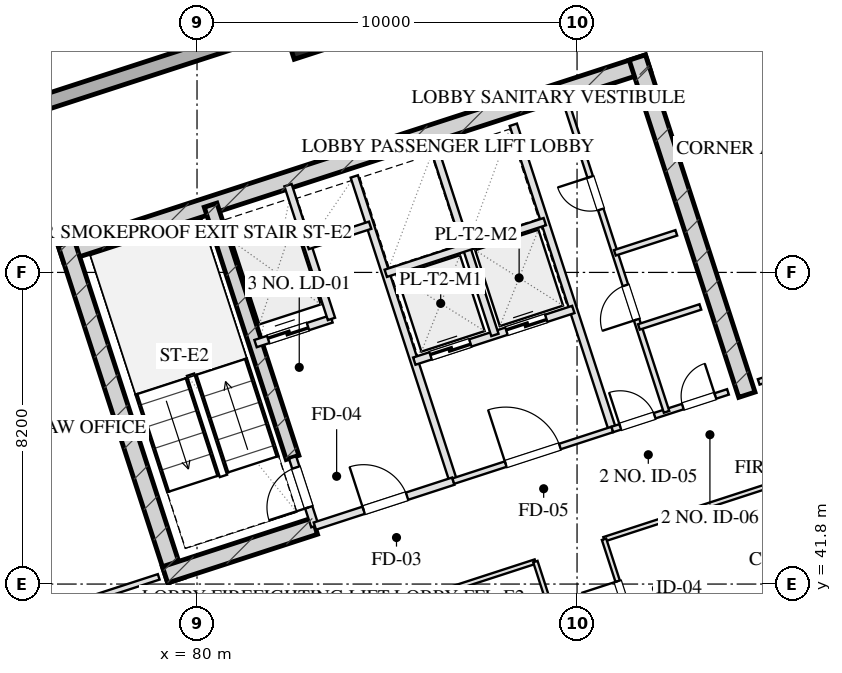
"""IFC4 building model, lengths in metres.
Left out: names, types, materials, properties, quantities, classifications, styles, units other than length and angle.
Written with IfcOpenShell. Run it as: python <this file> out.ifc"""

import sys

from ifc_helpers import new_model, si_unit, direction, frame, frame_2d, origin, origin_2d, place, context, subcontext, project, spatial, rectangle, hollow_rectangle, extrude, element, fill, save


model = new_model("IFC4")
c1 = context("Model", 3, precision=1e-05, world=origin(), true_north=direction((0.0, 1.0)))
c2 = subcontext(c1, "Body", "Model", "MODEL_VIEW")
j1 = project(units=[si_unit("LENGTHUNIT", "METRE"), si_unit("PLANEANGLEUNIT", "RADIAN")], contexts=[c1])
p1 = place(None, origin())
s1 = spatial("IfcSite", under=j1, at=p1, CompositionType="ELEMENT")
p2 = place(p1, origin())
s2 = spatial("IfcBuilding", under=s1, at=p2, CompositionType="ELEMENT")
p3 = place(p2, frame((0.0, 0.0, 195.5)))
s3 = spatial("IfcBuildingStorey", under=s2, at=p3, CompositionType="ELEMENT", Elevation=195.5)
p4 = place(p3, frame((76.415, 50.489, 0.0), z_axis=(0.0, 0.0, 1.0), x_axis=(0.951056810414, 0.309016089169, 0.0)))
e1 = element("IfcWall", 1, at=p4, inside=s3, PredefinedType="SHEAR", context=c2, shape_type="SweptSolid", body=[
    extrude(rectangle(XDim=16.25, YDim=0.45, at=frame_2d((8.125, 0.0))), origin(), (0.0, 0.0, 1.0), 3.45),
])
for number, where, z_axis, x_axis in (
    (2, (79.442, 41.899, 0.0), (0.0, 0.0, 1.0), (-0.309, 0.951, 0.0)),
    (3, (94.469, 46.781, 0.0), (0.0, 0.0, 1.0), (-0.309, 0.951, 0.0)),
):
    element("IfcWall", number, at=place(p3, frame(where, z_axis=z_axis, x_axis=x_axis)), inside=s3, PredefinedType="SHEAR", context=c2, shape_type="SweptSolid", body=[
        extrude(rectangle(XDim=9.33, YDim=0.45, at=frame_2d((4.665, 0.0))), origin(), (0.0, 0.0, 1.0), 3.45),
    ])
p5 = place(p3, frame((82.514, 45.131, 0.0), z_axis=(0.0, 0.0, 1.0), x_axis=(-0.308988790936, 0.951065679686, 0.0)))
e4 = element("IfcWall", 4, at=p5, inside=s3, PredefinedType="SHEAR", context=c2, shape_type="SweptSolid", body=[
    extrude(rectangle(XDim=6.98, YDim=0.35, at=frame_2d((3.49, 0.0))), origin(), (0.0, 0.0, 1.0), 3.45),
])
p6 = place(p3, frame((79.159, 42.043, 0.0), z_axis=(0.0, 0.0, 1.0), x_axis=(0.951047485828, 0.309044785913, 0.0)))
e5 = element("IfcWall", 5, at=p6, inside=s3, PredefinedType="SHEAR", context=c2, shape_type="SweptSolid", body=[
    extrude(rectangle(XDim=4.145, YDim=0.45, at=frame_2d((2.073, 0.0))), origin(), (0.0, 0.0, 1.0), 3.45),
])
p7 = place(p3, frame((82.815, 56.112, 0.0), z_axis=(0.0, 0.0, 1.0), x_axis=(0.951056516295, 0.309016994375, 0.0)))
e6 = element("IfcColumn", 6, at=p7, inside=s3, PredefinedType="COLUMN", context=c2, shape_type="SweptSolid", body=[
    extrude(hollow_rectangle(XDim=0.8, YDim=0.8, WallThickness=0.028, at=origin_2d()), origin(), (0.0, 0.0, 1.0), 3.451),
])
p8 = place(p3, frame((81.776, 8.827, 0.0), z_axis=(0.0, 0.0, 1.0), x_axis=(-0.309014228706, 0.951057414911, 0.0)))
e7 = element("IfcWall", 7, at=p8, inside=s3, PredefinedType="SOLIDWALL", context=c2, shape_type="SweptSolid", body=[
    extrude(rectangle(XDim=42.8, YDim=0.4, at=frame_2d((21.4, 0.0))), origin(), (0.0, 0.0, 1.0), 2.61),
])
p9 = place(p8, frame((22.95, 0.0, 0.75)))
e8 = element("IfcOpeningElement", 8, at=p9, cuts=e7, PredefinedType="OPENING", context=c2, shape_type="SweptSolid", body=[
    extrude(rectangle(XDim=2.1, YDim=1.46, at=frame_2d((1.05, 0.73))), frame((0.0, 0.21, 0.0), z_axis=(0.0, -1.0, 0.0), x_axis=(1.0, 0.0, 0.0)), (0.0, 0.0, 1.0), 0.42),
])
p10 = place(p8, frame((26.75, 0.0, 0.75)))
e9 = element("IfcOpeningElement", 9, at=p10, cuts=e7, PredefinedType="OPENING", context=c2, shape_type="SweptSolid", body=[
    extrude(rectangle(XDim=2.1, YDim=1.46, at=frame_2d((1.05, 0.73))), frame((0.0, 0.21, 0.0), z_axis=(0.0, -1.0, 0.0), x_axis=(1.0, 0.0, 0.0)), (0.0, 0.0, 1.0), 0.42),
])
p11 = place(p8, frame((17.787, 0.0, 0.0)))
e10 = element("IfcOpeningElement", 10, at=p11, cuts=e7, PredefinedType="OPENING", context=c2, shape_type="SweptSolid", body=[
    extrude(rectangle(XDim=1.1, YDim=2.15, at=frame_2d((0.55, 1.075))), frame((0.0, 0.21, 0.0), z_axis=(0.0, -1.0, 0.0), x_axis=(1.0, 0.0, 0.0)), (0.0, 0.0, 1.0), 0.42),
])
p12 = place(p3, frame((70.092, 52.556, 0.0), z_axis=(0.0, 0.0, 1.0), x_axis=(0.951057580055, 0.30901372044, 0.0)))
e11 = element("IfcWall", 11, at=p12, inside=s3, PredefinedType="SOLIDWALL", context=c2, shape_type="SweptSolid", body=[
    extrude(rectangle(XDim=26.4, YDim=0.4, at=frame_2d((13.2, 0.0))), origin(), (0.0, 0.0, 1.0), 2.61),
])
p13 = place(p3, frame((83.101, 43.324, 0.0), z_axis=(0.0, 0.0, 1.0), x_axis=(-0.309048298632, 0.951046344356, 0.0)))
e12 = element("IfcWall", 12, at=p13, inside=s3, PredefinedType="PARTITIONING", context=c2, shape_type="SweptSolid", body=[
    extrude(rectangle(XDim=1.9, YDim=0.2, at=frame_2d((0.95, 0.0))), origin(), (0.0, 0.0, 1.0), 3.175),
])
p14 = place(p13, frame((0.52, 0.0, 0.0)))
e13 = element("IfcOpeningElement", 13, at=p14, cuts=e12, PredefinedType="OPENING", context=c2, shape_type="SweptSolid", body=[
    extrude(rectangle(XDim=1.1, YDim=2.05, at=frame_2d((0.55, 1.025))), frame((0.0, 0.11, 0.0), z_axis=(0.0, -1.0, 0.0), x_axis=(1.0, 0.0, 0.0)), (0.0, 0.0, 1.0), 0.22),
])
p15 = place(p3, frame((86.743, 44.508, 0.0), z_axis=(0.0, 0.0, 1.0), x_axis=(-0.309016001439, 0.951056838919, 0.0)))
e14 = element("IfcWall", 14, at=p15, inside=s3, PredefinedType="PARTITIONING", context=c2, shape_type="SweptSolid", body=[
    extrude(rectangle(XDim=8.43, YDim=0.2, at=frame_2d((4.215, 0.0))), origin(), (0.0, 0.0, 1.0), 3.175),
])
p16 = place(p3, frame((83.101, 43.324, 0.0), z_axis=(0.0, 0.0, 1.0), x_axis=(0.951052804469, 0.309028417967, 0.0)))
e15 = element("IfcWall", 15, at=p16, inside=s3, PredefinedType="PARTITIONING", context=c2, shape_type="SweptSolid", body=[
    extrude(rectangle(XDim=3.83, YDim=0.2, at=frame_2d((1.915, 0.0))), origin(), (0.0, 0.0, 1.0), 3.175),
])
p17 = place(p16, frame((1.35, 0.0, 0.0)))
e16 = element("IfcOpeningElement", 16, at=p17, cuts=e15, PredefinedType="OPENING", context=c2, shape_type="SweptSolid", body=[
    extrude(rectangle(XDim=1.2, YDim=2.05, at=frame_2d((0.6, 1.025))), frame((0.0, 0.11, 0.0), z_axis=(0.0, -1.0, 0.0), x_axis=(1.0, 0.0, 0.0)), (0.0, 0.0, 1.0), 0.22),
])
p18 = place(p3, frame((81.54, 48.127, 0.0), z_axis=(0.0, 0.0, 1.0), x_axis=(0.951062257173, 0.308999325213, 0.0)))
e17 = element("IfcWall", 17, at=p18, inside=s3, PredefinedType="PARTITIONING", context=c2, shape_type="SweptSolid", body=[
    extrude(rectangle(XDim=2.1, YDim=0.2, at=frame_2d((1.05, 0.0))), origin(), (0.0, 0.0, 1.0), 3.175),
])
p19 = place(p18, frame((0.35, 0.0, 0.0)))
e18 = element("IfcOpeningElement", 18, at=p19, cuts=e17, PredefinedType="OPENING", context=c2, shape_type="SweptSolid", body=[
    extrude(rectangle(XDim=1.1, YDim=2.05, at=frame_2d((0.55, 1.025))), frame((0.0, 0.11, 0.0), z_axis=(0.0, -1.0, 0.0), x_axis=(1.0, 0.0, 0.0)), (0.0, 0.0, 1.0), 0.22),
])
p20 = place(p3, frame((83.538, 48.776, 0.0), z_axis=(0.0, 0.0, 1.0), x_axis=(-0.3089935693, 0.951064127245, 0.0)))
e19 = element("IfcWall", 19, at=p20, inside=s3, PredefinedType="PARTITIONING", context=c2, shape_type="SweptSolid", body=[
    extrude(rectangle(XDim=3.7, YDim=0.2, at=frame_2d((1.85, 0.0))), origin(), (0.0, 0.0, 1.0), 3.175),
])
p21 = place(p3, frame((82.91, 50.707, 0.0), z_axis=(0.0, 0.0, 1.0), x_axis=(0.951041328149, 0.309063734775, 0.0)))
e20 = element("IfcWall", 20, at=p21, inside=s3, PredefinedType="PARTITIONING", context=c2, shape_type="SweptSolid", body=[
    extrude(rectangle(XDim=1.73, YDim=0.2, at=frame_2d((0.865, 0.0))), origin(), (0.0, 0.0, 1.0), 3.175),
])
p22 = place(p3, frame((90.928, 45.868, 0.0), z_axis=(0.0, 0.0, 1.0), x_axis=(-0.309042196757, 0.951048327176, 0.0)))
e21 = element("IfcWall", 21, at=p22, inside=s3, PredefinedType="PARTITIONING", context=c2, shape_type="SweptSolid", body=[
    extrude(rectangle(XDim=8.43, YDim=0.2, at=frame_2d((4.215, 0.0))), origin(), (0.0, 0.0, 1.0), 3.175),
])
p23 = place(p3, frame((86.743, 44.508, 0.0), z_axis=(0.0, 0.0, 1.0), x_axis=(0.951063829732, 0.308994485023, 0.0)))
e22 = element("IfcWall", 22, at=p23, inside=s3, PredefinedType="PARTITIONING", context=c2, shape_type="SweptSolid", body=[
    extrude(rectangle(XDim=4.4, YDim=0.15, at=frame_2d((2.2, 0.0))), origin(), (0.0, 0.0, 1.0), 3.175),
])
p24 = place(p23, frame((1.45, 0.0, 0.0)))
e23 = element("IfcOpeningElement", 23, at=p24, cuts=e22, PredefinedType="OPENING", context=c2, shape_type="SweptSolid", body=[
    extrude(rectangle(XDim=1.5, YDim=2.05, at=frame_2d((0.75, 1.025))), frame((0.0, 0.085, 0.0), z_axis=(0.0, -1.0, 0.0), x_axis=(1.0, 0.0, 0.0)), (0.0, 0.0, 1.0), 0.17),
])
p25 = place(p3, frame((85.718, 47.666, 0.0), z_axis=(0.0, 0.0, 1.0), x_axis=(0.951058531764, 0.30901079133, 0.0)))
e24 = element("IfcWall", 24, at=p25, inside=s3, PredefinedType="PARTITIONING", context=c2, shape_type="SweptSolid", body=[
    extrude(rectangle(XDim=4.4, YDim=0.2, at=frame_2d((2.2, 0.0))), origin(), (0.0, 0.0, 1.0), 3.175),
])
p26 = place(p25, frame((0.45, 0.0, 0.0)))
e25 = element("IfcOpeningElement", 25, at=p26, cuts=e24, PredefinedType="OPENING", context=c2, shape_type="SweptSolid", body=[
    extrude(rectangle(XDim=1.1, YDim=2.05, at=frame_2d((0.55, 1.025))), frame((0.0, 0.11, 0.0), z_axis=(0.0, -1.0, 0.0), x_axis=(1.0, 0.0, 0.0)), (0.0, 0.0, 1.0), 0.22),
])
p27 = place(p25, frame((2.55, 0.0, 0.0)))
e26 = element("IfcOpeningElement", 26, at=p27, cuts=e24, PredefinedType="OPENING", context=c2, shape_type="SweptSolid", body=[
    extrude(rectangle(XDim=1.1, YDim=2.05, at=frame_2d((0.55, 1.025))), frame((0.0, 0.11, 0.0), z_axis=(0.0, -1.0, 0.0), x_axis=(1.0, 0.0, 0.0)), (0.0, 0.0, 1.0), 0.22),
])
p28 = place(p3, frame((87.838, 48.354, 0.0), z_axis=(0.0, 0.0, 1.0), x_axis=(-0.3090093719, 0.951058992953, 0.0)))
e27 = element("IfcWall", 27, at=p28, inside=s3, PredefinedType="PARTITIONING", context=c2, shape_type="SweptSolid", body=[
    extrude(rectangle(XDim=5.11, YDim=0.2, at=frame_2d((2.555, 0.0))), origin(), (0.0, 0.0, 1.0), 3.175),
])
p29 = place(p3, frame((84.967, 49.977, 0.0), z_axis=(0.0, 0.0, 1.0), x_axis=(0.951063829732, 0.308994485023, 0.0)))
e28 = element("IfcWall", 28, at=p29, inside=s3, PredefinedType="PARTITIONING", context=c2, shape_type="SweptSolid", body=[
    extrude(rectangle(XDim=4.4, YDim=0.2, at=frame_2d((2.2, 0.0))), origin(), (0.0, 0.0, 1.0), 3.175),
])
p30 = place(p3, frame((90.928, 45.868, 0.0), z_axis=(0.0, 0.0, 1.0), x_axis=(0.951059297078, 0.309008435874, 0.0)))
e29 = element("IfcWall", 29, at=p30, inside=s3, PredefinedType="PARTITIONING", context=c2, shape_type="SweptSolid", body=[
    extrude(rectangle(XDim=3.2, YDim=0.15, at=frame_2d((1.6, 0.0))), origin(), (0.0, 0.0, 1.0), 3.175),
])
p31 = place(p30, frame((0.22, 0.0, 0.0)))
e30 = element("IfcOpeningElement", 30, at=p31, cuts=e29, PredefinedType="OPENING", context=c2, shape_type="SweptSolid", body=[
    extrude(rectangle(XDim=0.95, YDim=2.05, at=frame_2d((0.475, 1.025))), frame((0.0, 0.085, 0.0), z_axis=(0.0, -1.0, 0.0), x_axis=(1.0, 0.0, 0.0)), (0.0, 0.0, 1.0), 0.17),
])
p32 = place(p30, frame((1.95, 0.0, 0.0)))
e31 = element("IfcOpeningElement", 31, at=p32, cuts=e29, PredefinedType="OPENING", context=c2, shape_type="SweptSolid", body=[
    extrude(rectangle(XDim=0.9, YDim=2.05, at=frame_2d((0.45, 1.025))), frame((0.0, 0.085, 0.0), z_axis=(0.0, -1.0, 0.0), x_axis=(1.0, 0.0, 0.0)), (0.0, 0.0, 1.0), 0.17),
])
p33 = place(p3, frame((92.355, 46.331, 0.0), z_axis=(0.0, 0.0, 1.0), x_axis=(-0.309007490203, 0.951059604335, 0.0)))
e32 = element("IfcWall", 32, at=p33, inside=s3, PredefinedType="PARTITIONING", context=c2, shape_type="SweptSolid", body=[
    extrude(rectangle(XDim=8.43, YDim=0.15, at=frame_2d((4.215, 0.0))), origin(), (0.0, 0.0, 1.0), 3.175),
])
p34 = place(p33, frame((2.55, 0.0, 0.0)))
e33 = element("IfcOpeningElement", 33, at=p34, cuts=e32, PredefinedType="OPENING", context=c2, shape_type="SweptSolid", body=[
    extrude(rectangle(XDim=0.95, YDim=2.05, at=frame_2d((0.475, 1.025))), frame((0.0, 0.085, 0.0), z_axis=(0.0, -1.0, 0.0), x_axis=(1.0, 0.0, 0.0)), (0.0, 0.0, 1.0), 0.17),
])
p35 = place(p33, frame((5.6, 0.0, 0.0)))
e34 = element("IfcOpeningElement", 34, at=p35, cuts=e32, PredefinedType="OPENING", context=c2, shape_type="SweptSolid", body=[
    extrude(rectangle(XDim=0.9, YDim=2.05, at=frame_2d((0.45, 1.025))), frame((0.0, 0.085, 0.0), z_axis=(0.0, -1.0, 0.0), x_axis=(1.0, 0.0, 0.0)), (0.0, 0.0, 1.0), 0.17),
])
p36 = place(p3, frame((90.995, 50.516, 0.0), z_axis=(0.0, 0.0, 1.0), x_axis=(0.951040401051, 0.309066587596, 0.0)))
e35 = element("IfcWall", 35, at=p36, inside=s3, PredefinedType="PARTITIONING", context=c2, shape_type="SweptSolid", body=[
    extrude(rectangle(XDim=1.7, YDim=0.15, at=frame_2d((0.85, 0.0))), origin(), (0.0, 0.0, 1.0), 3.175),
])
p37 = place(p3, frame((91.628, 48.566, 0.0), z_axis=(0.0, 0.0, 1.0), x_axis=(0.951054116971, 0.309024378638, 0.0)))
e36 = element("IfcWall", 36, at=p37, inside=s3, PredefinedType="PARTITIONING", context=c2, shape_type="SweptSolid", body=[
    extrude(rectangle(XDim=1.7, YDim=0.15, at=frame_2d((0.85, 0.0))), origin(), (0.0, 0.0, 1.0), 3.175),
])
p38 = place(p3, frame((71.955, 39.703, 0.0), z_axis=(0.0, 0.0, 1.0), x_axis=(0.951060977215, 0.309003264738, 0.0)))
e37 = element("IfcWall", 37, at=p38, inside=s3, PredefinedType="PARTITIONING", context=c2, shape_type="SweptSolid", body=[
    extrude(rectangle(XDim=7.4, YDim=0.15, at=frame_2d((3.7, 0.0))), origin(), (0.0, 0.0, 1.0), 2.15),
])
p39 = place(p38, frame((3.108, 0.0, 0.0)))
e38 = element("IfcOpeningElement", 38, at=p39, cuts=e37, PredefinedType="OPENING", context=c2, shape_type="SweptSolid", body=[
    extrude(rectangle(XDim=1.0, YDim=2.05, at=frame_2d((0.5, 1.025))), frame((0.0, 0.085, 0.0), z_axis=(0.0, -1.0, 0.0), x_axis=(1.0, 0.0, 0.0)), (0.0, 0.0, 1.0), 0.17),
])
p40 = place(p3, frame((94.78, 47.119, 0.0), z_axis=(0.0, 0.0, 1.0), x_axis=(0.951057811516, 0.309013008068, 0.0)))
e39 = element("IfcWall", 39, at=p40, inside=s3, PredefinedType="PARTITIONING", context=c2, shape_type="SweptSolid", body=[
    extrude(rectangle(XDim=6.8, YDim=0.15, at=frame_2d((3.4, 0.0))), origin(), (0.0, 0.0, 1.0), 3.175),
])
p41 = place(p40, frame((2.856, 0.0, 0.0)))
e40 = element("IfcOpeningElement", 40, at=p41, cuts=e39, PredefinedType="OPENING", context=c2, shape_type="SweptSolid", body=[
    extrude(rectangle(XDim=1.0, YDim=2.05, at=frame_2d((0.5, 1.025))), frame((0.0, 0.085, 0.0), z_axis=(0.0, -1.0, 0.0), x_axis=(1.0, 0.0, 0.0)), (0.0, 0.0, 1.0), 0.17),
])
p42 = place(p3, frame((83.672, 40.692, 0.0), z_axis=(0.0, 0.0, 1.0), x_axis=(0.951048747115, 0.30904090443, 0.0)))
e41 = element("IfcWall", 41, at=p42, inside=s3, PredefinedType="PARTITIONING", context=c2, shape_type="SweptSolid", body=[
    extrude(rectangle(XDim=5.5, YDim=0.12, at=frame_2d((2.75, 0.0))), origin(), (0.0, 0.0, 1.0), 3.175),
])
p43 = place(p3, frame((90.71, 42.979, 0.0), z_axis=(0.0, 0.0, 1.0), x_axis=(0.95105853842, 0.309010770845, 0.0)))
e42 = element("IfcWall", 42, at=p43, inside=s3, PredefinedType="PARTITIONING", context=c2, shape_type="SweptSolid", body=[
    extrude(rectangle(XDim=11.95, YDim=0.12, at=frame_2d((5.975, 0.0))), origin(), (0.0, 0.0, 1.0), 3.175),
])
p44 = place(p3, frame((94.045, 26.566, 0.0), z_axis=(0.0, 0.0, 1.0), x_axis=(-0.30901773025, 0.951056277195, 0.0)))
e43 = element("IfcWall", 43, at=p44, inside=s3, PredefinedType="PARTITIONING", context=c2, shape_type="SweptSolid", body=[
    extrude(rectangle(XDim=16.64, YDim=0.12, at=frame_2d((8.32, 0.0))), origin(), (0.0, 0.0, 1.0), 3.175),
])
p45 = place(p3, frame((95.852, 27.153, 0.0), z_axis=(0.0, 0.0, 1.0), x_axis=(-0.309004459387, 0.951060589068, 0.0)))
e44 = element("IfcWall", 44, at=p45, inside=s3, PredefinedType="PARTITIONING", context=c2, shape_type="SweptSolid", body=[
    extrude(rectangle(XDim=16.64, YDim=0.12, at=frame_2d((8.32, 0.0))), origin(), (0.0, 0.0, 1.0), 3.175),
])
p46 = place(p45, frame((1.16, 0.0, 0.0)))
e45 = element("IfcOpeningElement", 45, at=p46, cuts=e44, PredefinedType="OPENING", context=c2, shape_type="SweptSolid", body=[
    extrude(rectangle(XDim=1.0, YDim=2.05, at=frame_2d((0.5, 1.025))), frame((0.0, 0.07, 0.0), z_axis=(0.0, -1.0, 0.0), x_axis=(1.0, 0.0, 0.0)), (0.0, 0.0, 1.0), 0.14),
])
p47 = place(p45, frame((4.72, 0.0, 0.0)))
e46 = element("IfcOpeningElement", 46, at=p47, cuts=e44, PredefinedType="OPENING", context=c2, shape_type="SweptSolid", body=[
    extrude(rectangle(XDim=1.0, YDim=2.05, at=frame_2d((0.5, 1.025))), frame((0.0, 0.07, 0.0), z_axis=(0.0, -1.0, 0.0), x_axis=(1.0, 0.0, 0.0)), (0.0, 0.0, 1.0), 0.14),
])
p48 = place(p45, frame((7.82, 0.0, 0.0)))
e47 = element("IfcOpeningElement", 47, at=p48, cuts=e44, PredefinedType="OPENING", context=c2, shape_type="SweptSolid", body=[
    extrude(rectangle(XDim=1.05, YDim=2.05, at=frame_2d((0.525, 1.025))), frame((0.0, 0.07, 0.0), z_axis=(0.0, -1.0, 0.0), x_axis=(1.0, 0.0, 0.0)), (0.0, 0.0, 1.0), 0.14),
])
p49 = place(p45, frame((10.92, 0.0, 0.0)))
e48 = element("IfcOpeningElement", 48, at=p49, cuts=e44, PredefinedType="OPENING", context=c2, shape_type="SweptSolid", body=[
    extrude(rectangle(XDim=1.0, YDim=2.05, at=frame_2d((0.5, 1.025))), frame((0.0, 0.07, 0.0), z_axis=(0.0, -1.0, 0.0), x_axis=(1.0, 0.0, 0.0)), (0.0, 0.0, 1.0), 0.14),
])
p50 = place(p45, frame((14.48, 0.0, 0.0)))
e49 = element("IfcOpeningElement", 49, at=p50, cuts=e44, PredefinedType="OPENING", context=c2, shape_type="SweptSolid", body=[
    extrude(rectangle(XDim=1.0, YDim=2.05, at=frame_2d((0.5, 1.025))), frame((0.0, 0.07, 0.0), z_axis=(0.0, -1.0, 0.0), x_axis=(1.0, 0.0, 0.0)), (0.0, 0.0, 1.0), 0.14),
])
p51 = place(p3, frame((91.736, 39.821, 0.0), z_axis=(0.0, 0.0, 1.0), x_axis=(0.951052534024, 0.309029250277, 0.0)))
e50 = element("IfcWall", 50, at=p51, inside=s3, PredefinedType="PARTITIONING", context=c2, shape_type="SweptSolid", body=[
    extrude(rectangle(XDim=11.95, YDim=0.12, at=frame_2d((5.975, 0.0))), origin(), (0.0, 0.0, 1.0), 3.175),
])
p52 = place(p14, origin())
e51 = element("IfcDoor", 51, at=p52, inside=s3, OperationType="SINGLE_SWING_LEFT", PredefinedType="DOOR", context=c2, shape_type="SweptSolid", body=[
    extrude(rectangle(XDim=1.1, YDim=2.05, at=frame_2d((0.55, 1.025))), frame((0.0, 0.025, 0.0), z_axis=(0.0, -1.0, 0.0), x_axis=(1.0, 0.0, 0.0)), (0.0, 0.0, 1.0), 0.05),
])
fill(e13, e51)
p53 = place(p17, origin())
e52 = element("IfcDoor", 52, at=p53, inside=s3, OperationType="SINGLE_SWING_LEFT", PredefinedType="DOOR", context=c2, shape_type="SweptSolid", body=[
    extrude(rectangle(XDim=1.2, YDim=2.05, at=frame_2d((0.6, 1.025))), frame((0.0, 0.025, 0.0), z_axis=(0.0, -1.0, 0.0), x_axis=(1.0, 0.0, 0.0)), (0.0, 0.0, 1.0), 0.05),
])
fill(e16, e52)
p54 = place(p19, origin())
e53 = element("IfcDoor", 53, at=p54, inside=s3, OperationType="DOUBLE_DOOR_SLIDING", PredefinedType="DOOR", context=c2, shape_type="SweptSolid", body=[
    extrude(rectangle(XDim=1.1, YDim=2.05, at=frame_2d((0.55, 1.025))), frame((0.0, 0.025, 0.0), z_axis=(0.0, -1.0, 0.0), x_axis=(1.0, 0.0, 0.0)), (0.0, 0.0, 1.0), 0.05),
])
fill(e18, e53)
p55 = place(p24, origin())
e54 = element("IfcDoor", 54, at=p55, inside=s3, OperationType="SINGLE_SWING_LEFT", PredefinedType="DOOR", context=c2, shape_type="SweptSolid", body=[
    extrude(rectangle(XDim=1.5, YDim=2.05, at=frame_2d((0.75, 1.025))), frame((0.0, 0.025, 0.0), z_axis=(0.0, -1.0, 0.0), x_axis=(1.0, 0.0, 0.0)), (0.0, 0.0, 1.0), 0.05),
])
fill(e23, e54)
p56 = place(p26, origin())
e55 = element("IfcDoor", 55, at=p56, inside=s3, OperationType="DOUBLE_DOOR_SLIDING", PredefinedType="DOOR", context=c2, shape_type="SweptSolid", body=[
    extrude(rectangle(XDim=1.1, YDim=2.05, at=frame_2d((0.55, 1.025))), frame((0.0, 0.025, 0.0), z_axis=(0.0, -1.0, 0.0), x_axis=(1.0, 0.0, 0.0)), (0.0, 0.0, 1.0), 0.05),
])
fill(e25, e55)
p57 = place(p27, origin())
e56 = element("IfcDoor", 56, at=p57, inside=s3, OperationType="DOUBLE_DOOR_SLIDING", PredefinedType="DOOR", context=c2, shape_type="SweptSolid", body=[
    extrude(rectangle(XDim=1.1, YDim=2.05, at=frame_2d((0.55, 1.025))), frame((0.0, 0.025, 0.0), z_axis=(0.0, -1.0, 0.0), x_axis=(1.0, 0.0, 0.0)), (0.0, 0.0, 1.0), 0.05),
])
fill(e26, e56)
p58 = place(p31, origin())
e57 = element("IfcDoor", 57, at=p58, inside=s3, OperationType="SINGLE_SWING_LEFT", PredefinedType="DOOR", context=c2, shape_type="SweptSolid", body=[
    extrude(rectangle(XDim=0.95, YDim=2.05, at=frame_2d((0.475, 1.025))), frame((0.0, 0.025, 0.0), z_axis=(0.0, -1.0, 0.0), x_axis=(1.0, 0.0, 0.0)), (0.0, 0.0, 1.0), 0.05),
])
fill(e30, e57)
p59 = place(p32, origin())
e58 = element("IfcDoor", 58, at=p59, inside=s3, OperationType="SINGLE_SWING_RIGHT", PredefinedType="DOOR", context=c2, shape_type="SweptSolid", body=[
    extrude(rectangle(XDim=0.9, YDim=2.05, at=frame_2d((0.45, 1.025))), frame((0.0, 0.025, 0.0), z_axis=(0.0, -1.0, 0.0), x_axis=(1.0, 0.0, 0.0)), (0.0, 0.0, 1.0), 0.05),
])
fill(e31, e58)
p60 = place(p34, origin())
e59 = element("IfcDoor", 59, at=p60, inside=s3, OperationType="SINGLE_SWING_LEFT", PredefinedType="DOOR", context=c2, shape_type="SweptSolid", body=[
    extrude(rectangle(XDim=0.95, YDim=2.05, at=frame_2d((0.475, 1.025))), frame((0.0, 0.025, 0.0), z_axis=(0.0, -1.0, 0.0), x_axis=(1.0, 0.0, 0.0)), (0.0, 0.0, 1.0), 0.05),
])
fill(e33, e59)
p61 = place(p35, origin())
e60 = element("IfcDoor", 60, at=p61, inside=s3, OperationType="SINGLE_SWING_RIGHT", PredefinedType="DOOR", context=c2, shape_type="SweptSolid", body=[
    extrude(rectangle(XDim=0.9, YDim=2.05, at=frame_2d((0.45, 1.025))), frame((0.0, 0.025, 0.0), z_axis=(0.0, -1.0, 0.0), x_axis=(1.0, 0.0, 0.0)), (0.0, 0.0, 1.0), 0.05),
])
fill(e34, e60)
p62 = place(p50, origin())
e61 = element("IfcDoor", 61, at=p62, inside=s3, OperationType="SINGLE_SWING_RIGHT", PredefinedType="DOOR", context=c2, shape_type="SweptSolid", body=[
    extrude(rectangle(XDim=1.0, YDim=2.05, at=frame_2d((0.5, 1.025))), frame((0.0, 0.025, 0.0), z_axis=(0.0, -1.0, 0.0), x_axis=(1.0, 0.0, 0.0)), (0.0, 0.0, 1.0), 0.05),
])
fill(e49, e61)
save(model, sys.argv[1])
